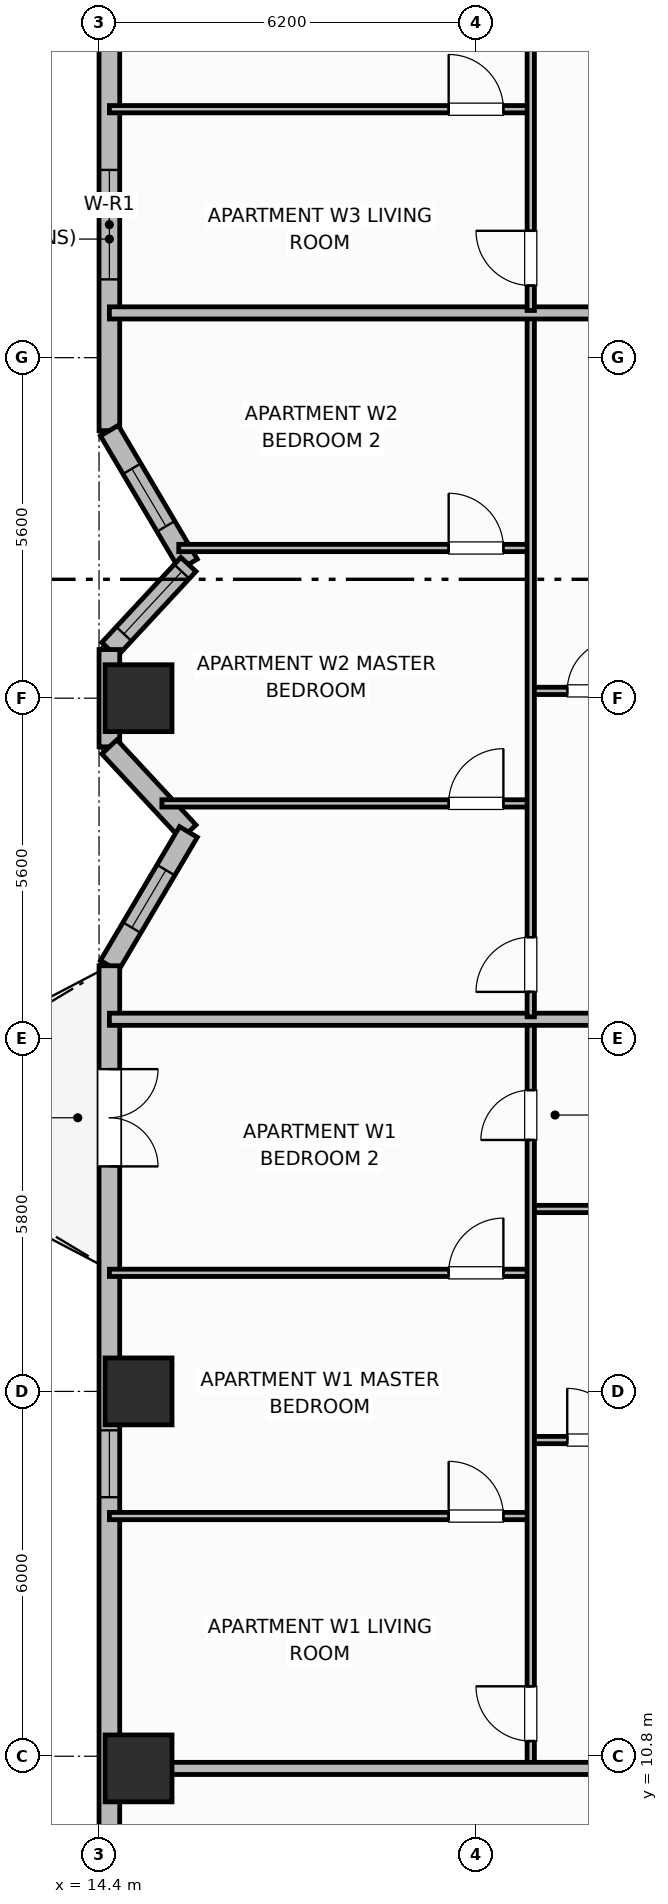
"""IFC4 building model, lengths in metres.
Left out: names, types, materials, properties, quantities, classifications, styles, units other than length and angle.
Written with IfcOpenShell. Run it as: python <this file> out.ifc"""

import sys

from ifc_helpers import new_model, si_unit, direction, frame, frame_2d, origin, origin_2d, place, context, subcontext, project, spatial, rectangle, extrude, element, fill, save


model = new_model("IFC4")
c1 = context("Model", 3, precision=1e-05, world=origin(), true_north=direction((0.0, 1.0)))
c2 = subcontext(c1, "Body", "Model", "MODEL_VIEW")
j1 = project(units=[si_unit("LENGTHUNIT", "METRE"), si_unit("PLANEANGLEUNIT", "RADIAN")], contexts=[c1])
p1 = place(None, origin())
s1 = spatial("IfcSite", under=j1, at=p1, CompositionType="ELEMENT")
p2 = place(p1, origin())
s2 = spatial("IfcBuilding", under=s1, at=p2, CompositionType="ELEMENT")
p3 = place(p2, frame((0.0, 0.0, 106.8)))
s3 = spatial("IfcBuildingStorey", under=s2, at=p3, CompositionType="ELEMENT", Elevation=106.8)
for number, where, z_axis, x_axis in (
    (1, (15.05, 10.6, 0.0), (0.0, 0.0, 1.0), (1.0, 0.0, 0.0)),
    (2, (15.05, 16.8, 0.0), (0.0, 0.0, 1.0), (1.0, 0.0, 0.0)),
    (3, (15.05, 28.2, 0.0), (0.0, 0.0, 1.0), (1.0, 0.0, 0.0)),
):
    element("IfcColumn", number, at=place(p3, frame(where, z_axis=z_axis, x_axis=x_axis)), inside=s3, PredefinedType="COLUMN", context=c2, shape_type="SweptSolid", body=[
        extrude(rectangle(XDim=1.1, YDim=1.1, at=origin_2d()), origin(), (0.0, 0.0, 1.0), 3.7),
    ])
p4 = place(p3, frame((14.57, 47.4, 0.0), z_axis=(0.0, 0.0, 1.0), x_axis=(0.0, -1.0, 0.0)))
e4 = element("IfcWall", 4, at=p4, inside=s3, PredefinedType="SOLIDWALL", context=c2, shape_type="SweptSolid", body=[
    extrude(rectangle(XDim=14.8, YDim=0.34, at=frame_2d((7.4, 0.0))), origin(), (0.0, 0.0, 1.0), 2.7),
])
p5 = place(p4, frame((2.76, 0.0, 0.69)))
e5 = element("IfcOpeningElement", 5, at=p5, cuts=e4, PredefinedType="OPENING", context=c2, shape_type="SweptSolid", body=[
    extrude(rectangle(XDim=1.4, YDim=1.85, at=frame_2d((0.7, 0.925))), frame((0.0, 0.18, 0.0), z_axis=(0.0, -1.0, 0.0), x_axis=(1.0, 0.0, 0.0)), (0.0, 0.0, 1.0), 0.36),
])
p6 = place(p4, frame((5.76, 0.0, 0.69)))
e6 = element("IfcOpeningElement", 6, at=p6, cuts=e4, PredefinedType="OPENING", context=c2, shape_type="SweptSolid", body=[
    extrude(rectangle(XDim=1.4, YDim=1.85, at=frame_2d((0.7, 0.925))), frame((0.0, 0.18, 0.0), z_axis=(0.0, -1.0, 0.0), x_axis=(1.0, 0.0, 0.0)), (0.0, 0.0, 1.0), 0.36),
])
p7 = place(p4, frame((10.512, 0.0, 0.73)))
e7 = element("IfcOpeningElement", 7, at=p7, cuts=e4, PredefinedType="OPENING", context=c2, shape_type="SweptSolid", body=[
    extrude(rectangle(XDim=1.8, YDim=1.85, at=frame_2d((0.9, 0.925))), frame((0.0, 0.18, 0.0), z_axis=(0.0, -1.0, 0.0), x_axis=(1.0, 0.0, 0.0)), (0.0, 0.0, 1.0), 0.36),
])
p8 = place(p3, frame((14.57, 32.6, 0.0), z_axis=(0.0, 0.0, 1.0), x_axis=(0.508710000703, -0.860937939218, 0.0)))
e8 = element("IfcWall", 8, at=p8, inside=s3, PredefinedType="SOLIDWALL", context=c2, shape_type="SweptSolid", body=[
    extrude(rectangle(XDim=2.556, YDim=0.34, at=frame_2d((1.278, 0.0))), origin(), (0.0, 0.0, 1.0), 2.7),
])
p9 = place(p8, frame((0.728, 0.0, 0.89)))
e9 = element("IfcOpeningElement", 9, at=p9, cuts=e8, PredefinedType="OPENING", context=c2, shape_type="SweptSolid", body=[
    extrude(rectangle(XDim=1.1, YDim=1.65, at=frame_2d((0.55, 0.825))), frame((0.0, 0.18, 0.0), z_axis=(0.0, -1.0, 0.0), x_axis=(1.0, 0.0, 0.0)), (0.0, 0.0, 1.0), 0.36),
])
p10 = place(p3, frame((15.87, 30.4, 0.0), z_axis=(0.0, 0.0, 1.0), x_axis=(-0.68049031116, -0.732757078722, 0.0)))
e10 = element("IfcWall", 10, at=p10, inside=s3, PredefinedType="SOLIDWALL", context=c2, shape_type="SweptSolid", body=[
    extrude(rectangle(XDim=1.91, YDim=0.34, at=frame_2d((0.955, 0.0))), origin(), (0.0, 0.0, 1.0), 2.7),
])
p11 = place(p10, frame((0.16, 0.0, 0.69)))
e11 = element("IfcOpeningElement", 11, at=p11, cuts=e10, PredefinedType="OPENING", context=c2, shape_type="SweptSolid", body=[
    extrude(rectangle(XDim=1.4, YDim=1.85, at=frame_2d((0.7, 0.925))), frame((0.0, 0.18, 0.0), z_axis=(0.0, -1.0, 0.0), x_axis=(1.0, 0.0, 0.0)), (0.0, 0.0, 1.0), 0.36),
])
p12 = place(p3, frame((14.57, 29.0, 0.0), z_axis=(0.0, 0.0, 1.0), x_axis=(0.0, -1.0, 0.0)))
e12 = element("IfcWall", 12, at=p12, inside=s3, PredefinedType="SOLIDWALL", context=c2, shape_type="SweptSolid", body=[
    extrude(rectangle(XDim=1.6, YDim=0.34, at=frame_2d((0.8, 0.0))), origin(), (0.0, 0.0, 1.0), 2.7),
])
p13 = place(p3, frame((14.57, 27.4, 0.0), z_axis=(0.0, 0.0, 1.0), x_axis=(0.68049031116, -0.732757078722, 0.0)))
e13 = element("IfcWall", 13, at=p13, inside=s3, PredefinedType="SOLIDWALL", context=c2, shape_type="SweptSolid", body=[
    extrude(rectangle(XDim=1.91, YDim=0.34, at=frame_2d((0.955, 0.0))), origin(), (0.0, 0.0, 1.0), 2.7),
])
p14 = place(p3, frame((15.87, 26.0, 0.0), z_axis=(0.0, 0.0, 1.0), x_axis=(-0.508751843651, -0.860913213734, 0.0)))
e14 = element("IfcWall", 14, at=p14, inside=s3, PredefinedType="SOLIDWALL", context=c2, shape_type="SweptSolid", body=[
    extrude(rectangle(XDim=2.555, YDim=0.34, at=frame_2d((1.278, 0.0))), origin(), (0.0, 0.0, 1.0), 2.7),
])
p15 = place(p14, frame((0.728, 0.0, 0.89)))
e15 = element("IfcOpeningElement", 15, at=p15, cuts=e14, PredefinedType="OPENING", context=c2, shape_type="SweptSolid", body=[
    extrude(rectangle(XDim=1.1, YDim=1.65, at=frame_2d((0.55, 0.825))), frame((0.0, 0.18, 0.0), z_axis=(0.0, -1.0, 0.0), x_axis=(1.0, 0.0, 0.0)), (0.0, 0.0, 1.0), 0.36),
])
p16 = place(p3, frame((14.57, 23.8, 0.0), z_axis=(0.0, 0.0, 1.0), x_axis=(0.0, -1.0, 0.0)))
e16 = element("IfcWall", 16, at=p16, inside=s3, PredefinedType="SOLIDWALL", context=c2, shape_type="SweptSolid", body=[
    extrude(rectangle(XDim=14.8, YDim=0.34, at=frame_2d((7.4, 0.0))), origin(), (0.0, 0.0, 1.0), 2.7),
])
p17 = place(p16, frame((1.7, 0.0, 0.0)))
e17 = element("IfcOpeningElement", 17, at=p17, cuts=e16, PredefinedType="OPENING", context=c2, shape_type="SweptSolid", body=[
    extrude(rectangle(XDim=1.6, YDim=2.1, at=frame_2d((0.8, 1.05))), frame((0.0, 0.18, 0.0), z_axis=(0.0, -1.0, 0.0), x_axis=(1.0, 0.0, 0.0)), (0.0, 0.0, 1.0), 0.36),
])
p18 = place(p16, frame((7.64, 0.0, 0.89)))
e18 = element("IfcOpeningElement", 18, at=p18, cuts=e16, PredefinedType="OPENING", context=c2, shape_type="SweptSolid", body=[
    extrude(rectangle(XDim=1.1, YDim=1.65, at=frame_2d((0.55, 0.825))), frame((0.0, 0.18, 0.0), z_axis=(0.0, -1.0, 0.0), x_axis=(1.0, 0.0, 0.0)), (0.0, 0.0, 1.0), 0.36),
])
p19 = place(p3, frame((21.5, 16.0, 0.0), z_axis=(0.0, 0.0, 1.0), x_axis=(1.0, 0.0, 0.0)))
e19 = element("IfcWall", 19, at=p19, inside=s3, PredefinedType="PARTITIONING", context=c2, shape_type="SweptSolid", body=[
    extrude(rectangle(XDim=2.25, YDim=0.12, at=frame_2d((1.125, 0.0))), origin(), (0.0, 0.0, 1.0), 2.53),
])
p20 = place(p19, frame((0.6, 0.0, 0.0)))
e20 = element("IfcOpeningElement", 20, at=p20, cuts=e19, PredefinedType="OPENING", context=c2, shape_type="SweptSolid", body=[
    extrude(rectangle(XDim=0.85, YDim=2.1, at=frame_2d((0.425, 1.05))), frame((0.0, 0.07, 0.0), z_axis=(0.0, -1.0, 0.0), x_axis=(1.0, 0.0, 0.0)), (0.0, 0.0, 1.0), 0.14),
])
p21 = place(p3, frame((21.5, 19.8, 0.0), z_axis=(0.0, 0.0, 1.0), x_axis=(1.0, 0.0, 0.0)))
e21 = element("IfcWall", 21, at=p21, inside=s3, PredefinedType="PARTITIONING", context=c2, shape_type="SweptSolid", body=[
    extrude(rectangle(XDim=2.25, YDim=0.12, at=frame_2d((1.125, 0.0))), origin(), (0.0, 0.0, 1.0), 2.53),
])
p22 = place(p3, frame((14.57, 14.75, 0.0), z_axis=(0.0, 0.0, 1.0), x_axis=(1.0, 0.0, 0.0)))
e22 = element("IfcWall", 22, at=p22, inside=s3, PredefinedType="PARTITIONING", context=c2, shape_type="SweptSolid", body=[
    extrude(rectangle(XDim=6.93, YDim=0.12, at=frame_2d((3.465, 0.0))), origin(), (0.0, 0.0, 1.0), 2.53),
])
p23 = place(p22, frame((5.58, 0.0, 0.0)))
e23 = element("IfcOpeningElement", 23, at=p23, cuts=e22, PredefinedType="OPENING", context=c2, shape_type="SweptSolid", body=[
    extrude(rectangle(XDim=0.9, YDim=2.1, at=frame_2d((0.45, 1.05))), frame((0.0, 0.07, 0.0), z_axis=(0.0, -1.0, 0.0), x_axis=(1.0, 0.0, 0.0)), (0.0, 0.0, 1.0), 0.14),
])
p24 = place(p3, frame((14.57, 18.75, 0.0), z_axis=(0.0, 0.0, 1.0), x_axis=(1.0, 0.0, 0.0)))
e24 = element("IfcWall", 24, at=p24, inside=s3, PredefinedType="PARTITIONING", context=c2, shape_type="SweptSolid", body=[
    extrude(rectangle(XDim=6.93, YDim=0.12, at=frame_2d((3.465, 0.0))), origin(), (0.0, 0.0, 1.0), 2.53),
])
p25 = place(p24, frame((5.58, 0.0, 0.0)))
e25 = element("IfcOpeningElement", 25, at=p25, cuts=e24, PredefinedType="OPENING", context=c2, shape_type="SweptSolid", body=[
    extrude(rectangle(XDim=0.9, YDim=2.1, at=frame_2d((0.45, 1.05))), frame((0.0, 0.07, 0.0), z_axis=(0.0, -1.0, 0.0), x_axis=(1.0, 0.0, 0.0)), (0.0, 0.0, 1.0), 0.14),
])
p26 = place(p3, frame((21.5, 10.64, 0.0), z_axis=(0.0, 0.0, 1.0), x_axis=(0.0, 1.0, 0.0)))
e26 = element("IfcWall", 26, at=p26, inside=s3, PredefinedType="PARTITIONING", context=c2, shape_type="SweptSolid", body=[
    extrude(rectangle(XDim=12.24, YDim=0.12, at=frame_2d((6.12, 0.0))), origin(), (0.0, 0.0, 1.0), 2.53),
])
p27 = place(p26, frame((0.41, 0.0, 0.0)))
e27 = element("IfcOpeningElement", 27, at=p27, cuts=e26, PredefinedType="OPENING", context=c2, shape_type="SweptSolid", body=[
    extrude(rectangle(XDim=0.9, YDim=2.1, at=frame_2d((0.45, 1.05))), frame((0.0, 0.07, 0.0), z_axis=(0.0, -1.0, 0.0), x_axis=(1.0, 0.0, 0.0)), (0.0, 0.0, 1.0), 0.14),
])
p28 = place(p26, frame((10.295, 0.0, 0.0)))
e28 = element("IfcOpeningElement", 28, at=p28, cuts=e26, PredefinedType="OPENING", context=c2, shape_type="SweptSolid", body=[
    extrude(rectangle(XDim=0.82, YDim=2.08, at=frame_2d((0.41, 1.04))), frame((0.0, 0.07, 0.0), z_axis=(0.0, -1.0, 0.0), x_axis=(1.0, 0.0, 0.0)), (0.0, 0.0, 1.0), 0.14),
])
p29 = place(p3, frame((14.57, 22.92, 0.0), z_axis=(0.0, 0.0, 1.0), x_axis=(1.0, 0.0, 0.0)))
e29 = element("IfcWall", 29, at=p29, inside=s3, PredefinedType="PARTITIONING", context=c2, shape_type="SweptSolid", body=[
    extrude(rectangle(XDim=9.18, YDim=0.2, at=frame_2d((4.59, 0.0))), origin(), (0.0, 0.0, 1.0), 2.53),
])
p30 = place(p3, frame((21.5, 28.32, 0.0), z_axis=(0.0, 0.0, 1.0), x_axis=(1.0, 0.0, 0.0)))
e30 = element("IfcWall", 30, at=p30, inside=s3, PredefinedType="PARTITIONING", context=c2, shape_type="SweptSolid", body=[
    extrude(rectangle(XDim=2.25, YDim=0.12, at=frame_2d((1.125, 0.0))), origin(), (0.0, 0.0, 1.0), 2.53),
])
p31 = place(p30, frame((0.6, 0.0, 0.0)))
e31 = element("IfcOpeningElement", 31, at=p31, cuts=e30, PredefinedType="OPENING", context=c2, shape_type="SweptSolid", body=[
    extrude(rectangle(XDim=0.85, YDim=2.1, at=frame_2d((0.425, 1.05))), frame((0.0, 0.07, 0.0), z_axis=(0.0, -1.0, 0.0), x_axis=(1.0, 0.0, 0.0)), (0.0, 0.0, 1.0), 0.14),
])
p32 = place(p3, frame((15.434, 26.47, 0.0), z_axis=(0.0, 0.0, 1.0), x_axis=(1.0, 0.0, 0.0)))
e32 = element("IfcWall", 32, at=p32, inside=s3, PredefinedType="PARTITIONING", context=c2, shape_type="SweptSolid", body=[
    extrude(rectangle(XDim=6.066, YDim=0.12, at=frame_2d((3.033, 0.0))), origin(), (0.0, 0.0, 1.0), 2.53),
])
p33 = place(p32, frame((4.716, 0.0, 0.0)))
e33 = element("IfcOpeningElement", 33, at=p33, cuts=e32, PredefinedType="OPENING", context=c2, shape_type="SweptSolid", body=[
    extrude(rectangle(XDim=0.9, YDim=2.1, at=frame_2d((0.45, 1.05))), frame((0.0, 0.07, 0.0), z_axis=(0.0, -1.0, 0.0), x_axis=(1.0, 0.0, 0.0)), (0.0, 0.0, 1.0), 0.14),
])
p34 = place(p3, frame((15.71, 30.67, 0.0), z_axis=(0.0, 0.0, 1.0), x_axis=(1.0, 0.0, 0.0)))
e34 = element("IfcWall", 34, at=p34, inside=s3, PredefinedType="PARTITIONING", context=c2, shape_type="SweptSolid", body=[
    extrude(rectangle(XDim=5.79, YDim=0.12, at=frame_2d((2.895, 0.0))), origin(), (0.0, 0.0, 1.0), 2.53),
])
p35 = place(p34, frame((4.439, 0.0, 0.0)))
e35 = element("IfcOpeningElement", 35, at=p35, cuts=e34, PredefinedType="OPENING", context=c2, shape_type="SweptSolid", body=[
    extrude(rectangle(XDim=0.9, YDim=2.1, at=frame_2d((0.45, 1.05))), frame((0.0, 0.07, 0.0), z_axis=(0.0, -1.0, 0.0), x_axis=(1.0, 0.0, 0.0)), (0.0, 0.0, 1.0), 0.14),
])
p36 = place(p3, frame((21.5, 22.96, 0.0), z_axis=(0.0, 0.0, 1.0), x_axis=(0.0, 1.0, 0.0)))
e36 = element("IfcWall", 36, at=p36, inside=s3, PredefinedType="PARTITIONING", context=c2, shape_type="SweptSolid", body=[
    extrude(rectangle(XDim=11.536, YDim=0.12, at=frame_2d((5.768, 0.0))), origin(), (0.0, 0.0, 1.0), 2.53),
])
p37 = place(p36, frame((0.41, 0.0, 0.0)))
e37 = element("IfcOpeningElement", 37, at=p37, cuts=e36, PredefinedType="OPENING", context=c2, shape_type="SweptSolid", body=[
    extrude(rectangle(XDim=0.9, YDim=2.1, at=frame_2d((0.45, 1.05))), frame((0.0, 0.07, 0.0), z_axis=(0.0, -1.0, 0.0), x_axis=(1.0, 0.0, 0.0)), (0.0, 0.0, 1.0), 0.14),
])
p38 = place(p3, frame((14.57, 34.536, 0.0), z_axis=(0.0, 0.0, 1.0), x_axis=(1.0, 0.0, 0.0)))
e38 = element("IfcWall", 38, at=p38, inside=s3, PredefinedType="PARTITIONING", context=c2, shape_type="SweptSolid", body=[
    extrude(rectangle(XDim=9.18, YDim=0.2, at=frame_2d((4.59, 0.0))), origin(), (0.0, 0.0, 1.0), 2.53),
])
p39 = place(p3, frame((14.57, 37.886, 0.0), z_axis=(0.0, 0.0, 1.0), x_axis=(1.0, 0.0, 0.0)))
e39 = element("IfcWall", 39, at=p39, inside=s3, PredefinedType="PARTITIONING", context=c2, shape_type="SweptSolid", body=[
    extrude(rectangle(XDim=6.93, YDim=0.12, at=frame_2d((3.465, 0.0))), origin(), (0.0, 0.0, 1.0), 2.53),
])
p40 = place(p39, frame((5.58, 0.0, 0.0)))
e40 = element("IfcOpeningElement", 40, at=p40, cuts=e39, PredefinedType="OPENING", context=c2, shape_type="SweptSolid", body=[
    extrude(rectangle(XDim=0.9, YDim=2.1, at=frame_2d((0.45, 1.05))), frame((0.0, 0.07, 0.0), z_axis=(0.0, -1.0, 0.0), x_axis=(1.0, 0.0, 0.0)), (0.0, 0.0, 1.0), 0.14),
])
p41 = place(p3, frame((21.5, 34.576, 0.0), z_axis=(0.0, 0.0, 1.0), x_axis=(0.0, 1.0, 0.0)))
e41 = element("IfcWall", 41, at=p41, inside=s3, PredefinedType="PARTITIONING", context=c2, shape_type="SweptSolid", body=[
    extrude(rectangle(XDim=11.184, YDim=0.12, at=frame_2d((5.592, 0.0))), origin(), (0.0, 0.0, 1.0), 2.53),
])
p42 = place(p41, frame((0.41, 0.0, 0.0)))
e42 = element("IfcOpeningElement", 42, at=p42, cuts=e41, PredefinedType="OPENING", context=c2, shape_type="SweptSolid", body=[
    extrude(rectangle(XDim=0.9, YDim=2.1, at=frame_2d((0.45, 1.05))), frame((0.0, 0.07, 0.0), z_axis=(0.0, -1.0, 0.0), x_axis=(1.0, 0.0, 0.0)), (0.0, 0.0, 1.0), 0.14),
])
p43 = place(p3, frame((14.99, 10.6, 0.0), z_axis=(0.0, 0.0, 1.0), x_axis=(1.0, 0.0, 0.0)))
e43 = element("IfcWall", 43, at=p43, inside=s3, PredefinedType="PARTITIONING", context=c2, shape_type="SweptSolid", body=[
    extrude(rectangle(XDim=8.76, YDim=0.2, at=frame_2d((4.38, 0.0))), origin(), (0.0, 0.0, 1.0), 2.53),
])
p44 = place(p7, origin())
e44 = element("IfcWindow", 44, at=p44, inside=s3, PartitioningType="SINGLE_PANEL", PredefinedType="WINDOW", context=c2, shape_type="SweptSolid", body=[
    extrude(rectangle(XDim=1.8, YDim=1.85, at=frame_2d((0.9, 0.925))), frame((0.0, 0.03, 0.0), z_axis=(0.0, -1.0, 0.0), x_axis=(1.0, 0.0, 0.0)), (0.0, 0.0, 1.0), 0.06),
])
fill(e7, e44)
p45 = place(p9, origin())
e45 = element("IfcWindow", 45, at=p45, inside=s3, PartitioningType="SINGLE_PANEL", PredefinedType="WINDOW", context=c2, shape_type="SweptSolid", body=[
    extrude(rectangle(XDim=1.1, YDim=1.65, at=frame_2d((0.55, 0.825))), frame((0.0, 0.03, 0.0), z_axis=(0.0, -1.0, 0.0), x_axis=(1.0, 0.0, 0.0)), (0.0, 0.0, 1.0), 0.06),
])
fill(e9, e45)
p46 = place(p11, origin())
e46 = element("IfcWindow", 46, at=p46, inside=s3, PartitioningType="SINGLE_PANEL", PredefinedType="WINDOW", context=c2, shape_type="SweptSolid", body=[
    extrude(rectangle(XDim=1.4, YDim=1.85, at=frame_2d((0.7, 0.925))), frame((0.0, 0.03, 0.0), z_axis=(0.0, -1.0, 0.0), x_axis=(1.0, 0.0, 0.0)), (0.0, 0.0, 1.0), 0.06),
])
fill(e11, e46)
p47 = place(p15, origin())
e47 = element("IfcWindow", 47, at=p47, inside=s3, PartitioningType="SINGLE_PANEL", PredefinedType="WINDOW", context=c2, shape_type="SweptSolid", body=[
    extrude(rectangle(XDim=1.1, YDim=1.65, at=frame_2d((0.55, 0.825))), frame((0.0, 0.03, 0.0), z_axis=(0.0, -1.0, 0.0), x_axis=(1.0, 0.0, 0.0)), (0.0, 0.0, 1.0), 0.06),
])
fill(e15, e47)
p48 = place(p17, origin())
e48 = element("IfcDoor", 48, at=p48, inside=s3, OperationType="DOUBLE_DOOR_SINGLE_SWING", PredefinedType="DOOR", context=c2, shape_type="SweptSolid", body=[
    extrude(rectangle(XDim=1.6, YDim=2.1, at=frame_2d((0.8, 1.05))), frame((0.0, 0.025, 0.0), z_axis=(0.0, -1.0, 0.0), x_axis=(1.0, 0.0, 0.0)), (0.0, 0.0, 1.0), 0.05),
])
fill(e17, e48)
p49 = place(p18, origin())
e49 = element("IfcWindow", 49, at=p49, inside=s3, PartitioningType="SINGLE_PANEL", PredefinedType="WINDOW", context=c2, shape_type="SweptSolid", body=[
    extrude(rectangle(XDim=1.1, YDim=1.65, at=frame_2d((0.55, 0.825))), frame((0.0, 0.03, 0.0), z_axis=(0.0, -1.0, 0.0), x_axis=(1.0, 0.0, 0.0)), (0.0, 0.0, 1.0), 0.06),
])
fill(e18, e49)
p50 = place(p20, origin())
e50 = element("IfcDoor", 50, at=p50, inside=s3, OperationType="SINGLE_SWING_LEFT", PredefinedType="DOOR", context=c2, shape_type="SweptSolid", body=[
    extrude(rectangle(XDim=0.85, YDim=2.1, at=frame_2d((0.425, 1.05))), frame((0.0, 0.025, 0.0), z_axis=(0.0, -1.0, 0.0), x_axis=(1.0, 0.0, 0.0)), (0.0, 0.0, 1.0), 0.05),
])
fill(e20, e50)
p51 = place(p23, origin())
e51 = element("IfcDoor", 51, at=p51, inside=s3, OperationType="SINGLE_SWING_LEFT", PredefinedType="DOOR", context=c2, shape_type="SweptSolid", body=[
    extrude(rectangle(XDim=0.9, YDim=2.1, at=frame_2d((0.45, 1.05))), frame((0.0, 0.025, 0.0), z_axis=(0.0, -1.0, 0.0), x_axis=(1.0, 0.0, 0.0)), (0.0, 0.0, 1.0), 0.05),
])
fill(e23, e51)
p52 = place(p25, origin())
e52 = element("IfcDoor", 52, at=p52, inside=s3, OperationType="SINGLE_SWING_RIGHT", PredefinedType="DOOR", context=c2, shape_type="SweptSolid", body=[
    extrude(rectangle(XDim=0.9, YDim=2.1, at=frame_2d((0.45, 1.05))), frame((0.0, 0.025, 0.0), z_axis=(0.0, -1.0, 0.0), x_axis=(1.0, 0.0, 0.0)), (0.0, 0.0, 1.0), 0.05),
])
fill(e25, e52)
p53 = place(p27, origin())
e53 = element("IfcDoor", 53, at=p53, inside=s3, OperationType="SINGLE_SWING_RIGHT", PredefinedType="DOOR", context=c2, shape_type="SweptSolid", body=[
    extrude(rectangle(XDim=0.9, YDim=2.1, at=frame_2d((0.45, 1.05))), frame((0.0, 0.025, 0.0), z_axis=(0.0, -1.0, 0.0), x_axis=(1.0, 0.0, 0.0)), (0.0, 0.0, 1.0), 0.05),
])
fill(e27, e53)
p54 = place(p28, origin())
e54 = element("IfcDoor", 54, at=p54, inside=s3, OperationType="SINGLE_SWING_LEFT", PredefinedType="DOOR", context=c2, shape_type="SweptSolid", body=[
    extrude(rectangle(XDim=0.82, YDim=2.08, at=frame_2d((0.41, 1.04))), frame((0.0, 0.025, 0.0), z_axis=(0.0, -1.0, 0.0), x_axis=(1.0, 0.0, 0.0)), (0.0, 0.0, 1.0), 0.05),
])
fill(e28, e54)
p55 = place(p31, origin())
e55 = element("IfcDoor", 55, at=p55, inside=s3, OperationType="SINGLE_SWING_RIGHT", PredefinedType="DOOR", context=c2, shape_type="SweptSolid", body=[
    extrude(rectangle(XDim=0.85, YDim=2.1, at=frame_2d((0.425, 1.05))), frame((0.0, 0.025, 0.0), z_axis=(0.0, -1.0, 0.0), x_axis=(1.0, 0.0, 0.0)), (0.0, 0.0, 1.0), 0.05),
])
fill(e31, e55)
p56 = place(p33, origin())
e56 = element("IfcDoor", 56, at=p56, inside=s3, OperationType="SINGLE_SWING_RIGHT", PredefinedType="DOOR", context=c2, shape_type="SweptSolid", body=[
    extrude(rectangle(XDim=0.9, YDim=2.1, at=frame_2d((0.45, 1.05))), frame((0.0, 0.025, 0.0), z_axis=(0.0, -1.0, 0.0), x_axis=(1.0, 0.0, 0.0)), (0.0, 0.0, 1.0), 0.05),
])
fill(e33, e56)
p57 = place(p35, origin())
e57 = element("IfcDoor", 57, at=p57, inside=s3, OperationType="SINGLE_SWING_LEFT", PredefinedType="DOOR", context=c2, shape_type="SweptSolid", body=[
    extrude(rectangle(XDim=0.9, YDim=2.1, at=frame_2d((0.45, 1.05))), frame((0.0, 0.025, 0.0), z_axis=(0.0, -1.0, 0.0), x_axis=(1.0, 0.0, 0.0)), (0.0, 0.0, 1.0), 0.05),
])
fill(e35, e57)
p58 = place(p37, origin())
e58 = element("IfcDoor", 58, at=p58, inside=s3, OperationType="SINGLE_SWING_LEFT", PredefinedType="DOOR", context=c2, shape_type="SweptSolid", body=[
    extrude(rectangle(XDim=0.9, YDim=2.1, at=frame_2d((0.45, 1.05))), frame((0.0, 0.025, 0.0), z_axis=(0.0, -1.0, 0.0), x_axis=(1.0, 0.0, 0.0)), (0.0, 0.0, 1.0), 0.05),
])
fill(e37, e58)
p59 = place(p40, origin())
e59 = element("IfcDoor", 59, at=p59, inside=s3, OperationType="SINGLE_SWING_LEFT", PredefinedType="DOOR", context=c2, shape_type="SweptSolid", body=[
    extrude(rectangle(XDim=0.9, YDim=2.1, at=frame_2d((0.45, 1.05))), frame((0.0, 0.025, 0.0), z_axis=(0.0, -1.0, 0.0), x_axis=(1.0, 0.0, 0.0)), (0.0, 0.0, 1.0), 0.05),
])
fill(e40, e59)
p60 = place(p42, origin())
e60 = element("IfcDoor", 60, at=p60, inside=s3, OperationType="SINGLE_SWING_RIGHT", PredefinedType="DOOR", context=c2, shape_type="SweptSolid", body=[
    extrude(rectangle(XDim=0.9, YDim=2.1, at=frame_2d((0.45, 1.05))), frame((0.0, 0.025, 0.0), z_axis=(0.0, -1.0, 0.0), x_axis=(1.0, 0.0, 0.0)), (0.0, 0.0, 1.0), 0.05),
])
fill(e42, e60)
save(model, sys.argv[1])
